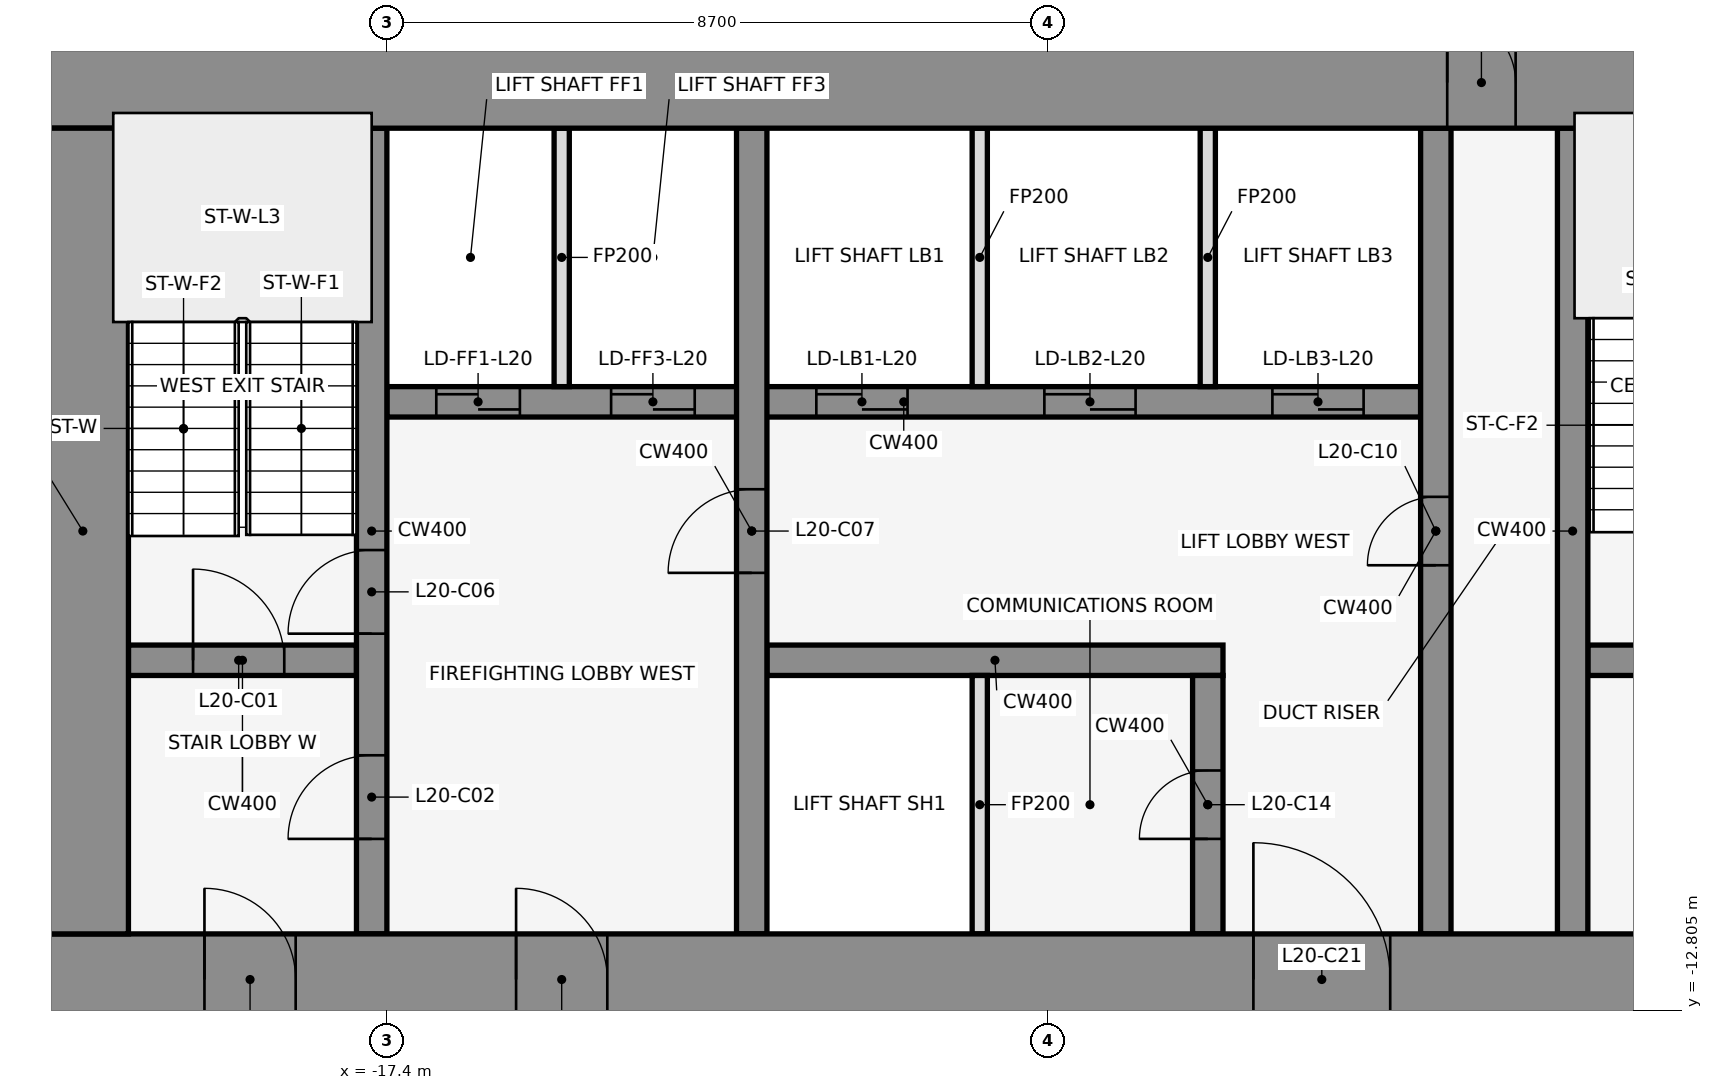
"""IFC4 building model, lengths in metres.
Left out: names, types, materials, properties, quantities, classifications, styles, units other than length and angle.
Written with IfcOpenShell. Run it as: python <this file> out.ifc"""

import sys

from ifc_helpers import new_model, si_unit, direction, frame, frame_2d, origin, place, context, subcontext, project, spatial, rectangle, extrude, element, fill, save


model = new_model("IFC4")
c1 = context("Model", 3, precision=1e-05, world=origin(), true_north=direction((0.0, 1.0)))
c2 = subcontext(c1, "Body", "Model", "MODEL_VIEW")
j1 = project(units=[si_unit("LENGTHUNIT", "METRE"), si_unit("PLANEANGLEUNIT", "RADIAN")], contexts=[c1])
p1 = place(None, origin())
s1 = spatial("IfcSite", under=j1, at=p1, CompositionType="ELEMENT")
p2 = place(p1, origin())
s2 = spatial("IfcBuilding", under=s1, at=p2, CompositionType="ELEMENT")
p3 = place(p2, frame((0.0, 0.0, 98.1)))
s3 = spatial("IfcBuildingStorey", under=s2, at=p3, CompositionType="ELEMENT", Elevation=98.1)
for number, where, z_axis, x_axis in (
    (1, (-0.068, -0.105, 0.0), (0.0, 0.0, 1.0), (-0.84, 0.543, 0.0)),
    (2, (-14.599, 1.08, 0.0), (0.0, 0.0, 1.0), (-0.84, -0.543, 0.0)),
):
    element("IfcWall", number, at=place(p3, frame(where, z_axis=z_axis, x_axis=x_axis)), inside=s3, PredefinedType="STANDARD", context=c2, shape_type="SweptSolid", body=[
        extrude(rectangle(XDim=2.183, YDim=0.25, at=frame_2d((1.091, 0.0))), origin(), (0.0, 0.0, 1.0), 3.95),
    ])
p4 = place(p3, frame((-20.8, -8.2, 0.0), z_axis=(0.0, 0.0, 1.0), x_axis=(1.0, 0.0, 0.0)))
e3 = element("IfcWall", 3, at=p4, inside=s3, PredefinedType="SHEAR", context=c2, shape_type="SweptSolid", body=[
    extrude(rectangle(XDim=3.0, YDim=0.4, at=frame_2d((1.5, 0.0))), origin(), (0.0, 0.0, 1.0), 4.1),
])
p5 = place(p4, frame((0.85, 0.0, 0.0)))
e4 = element("IfcOpeningElement", 4, at=p5, cuts=e3, PredefinedType="OPENING", context=c2, shape_type="SweptSolid", body=[
    extrude(rectangle(XDim=1.2, YDim=2.1, at=frame_2d((0.6, 1.05))), frame((0.0, 0.212, 0.0), z_axis=(0.0, -1.0, 0.0), x_axis=(1.0, 0.0, 0.0)), (0.0, 0.0, 1.0), 0.424),
])
p6 = place(p3, frame((-12.4, -8.2, 0.0), z_axis=(0.0, 0.0, 1.0), x_axis=(1.0, 0.0, 0.0)))
e5 = element("IfcWall", 5, at=p6, inside=s3, PredefinedType="SHEAR", context=c2, shape_type="SweptSolid", body=[
    extrude(rectangle(XDim=6.0, YDim=0.4, at=frame_2d((3.0, 0.0))), origin(), (0.0, 0.0, 1.0), 4.1),
])
p7 = place(p3, frame((-1.6, -8.2, 0.0), z_axis=(0.0, 0.0, 1.0), x_axis=(1.0, 0.0, 0.0)))
e6 = element("IfcWall", 6, at=p7, inside=s3, PredefinedType="SHEAR", context=c2, shape_type="SweptSolid", body=[
    extrude(rectangle(XDim=3.2, YDim=0.4, at=frame_2d((1.6, 0.0))), origin(), (0.0, 0.0, 1.0), 4.1),
])
p8 = place(p7, frame((1.05, 0.0, 0.0)))
e7 = element("IfcOpeningElement", 7, at=p8, cuts=e6, PredefinedType="OPENING", context=c2, shape_type="SweptSolid", body=[
    extrude(rectangle(XDim=1.2, YDim=2.1, at=frame_2d((0.6, 1.05))), frame((0.0, 0.212, 0.0), z_axis=(0.0, -1.0, 0.0), x_axis=(1.0, 0.0, 0.0)), (0.0, 0.0, 1.0), 0.424),
])
p9 = place(p3, frame((-17.4, -4.8, 0.0), z_axis=(0.0, 0.0, 1.0), x_axis=(1.0, 0.0, 0.0)))
e8 = element("IfcWall", 8, at=p9, inside=s3, PredefinedType="SHEAR", context=c2, shape_type="SweptSolid", body=[
    extrude(rectangle(XDim=13.6, YDim=0.4, at=frame_2d((6.8, 0.0))), origin(), (0.0, 0.0, 1.0), 4.1),
])
p10 = place(p9, frame((0.65, 0.0, 0.0)))
e9 = element("IfcOpeningElement", 9, at=p10, cuts=e8, PredefinedType="OPENING", context=c2, shape_type="SweptSolid", body=[
    extrude(rectangle(XDim=1.1, YDim=2.1, at=frame_2d((0.55, 1.05))), frame((0.0, 0.212, 0.0), z_axis=(0.0, -1.0, 0.0), x_axis=(1.0, 0.0, 0.0)), (0.0, 0.0, 1.0), 0.424),
])
p11 = place(p9, frame((2.95, 0.0, 0.0)))
e10 = element("IfcOpeningElement", 10, at=p11, cuts=e8, PredefinedType="OPENING", context=c2, shape_type="SweptSolid", body=[
    extrude(rectangle(XDim=1.1, YDim=2.1, at=frame_2d((0.55, 1.05))), frame((0.0, 0.212, 0.0), z_axis=(0.0, -1.0, 0.0), x_axis=(1.0, 0.0, 0.0)), (0.0, 0.0, 1.0), 0.424),
])
p12 = place(p9, frame((5.65, 0.0, 0.0)))
e11 = element("IfcOpeningElement", 11, at=p12, cuts=e8, PredefinedType="OPENING", context=c2, shape_type="SweptSolid", body=[
    extrude(rectangle(XDim=1.2, YDim=2.1, at=frame_2d((0.6, 1.05))), frame((0.0, 0.212, 0.0), z_axis=(0.0, -1.0, 0.0), x_axis=(1.0, 0.0, 0.0)), (0.0, 0.0, 1.0), 0.424),
])
p13 = place(p9, frame((8.65, 0.0, 0.0)))
e12 = element("IfcOpeningElement", 12, at=p13, cuts=e8, PredefinedType="OPENING", context=c2, shape_type="SweptSolid", body=[
    extrude(rectangle(XDim=1.2, YDim=2.1, at=frame_2d((0.6, 1.05))), frame((0.0, 0.212, 0.0), z_axis=(0.0, -1.0, 0.0), x_axis=(1.0, 0.0, 0.0)), (0.0, 0.0, 1.0), 0.424),
])
p14 = place(p9, frame((11.65, 0.0, 0.0)))
e13 = element("IfcOpeningElement", 13, at=p14, cuts=e8, PredefinedType="OPENING", context=c2, shape_type="SweptSolid", body=[
    extrude(rectangle(XDim=1.2, YDim=2.1, at=frame_2d((0.6, 1.05))), frame((0.0, 0.212, 0.0), z_axis=(0.0, -1.0, 0.0), x_axis=(1.0, 0.0, 0.0)), (0.0, 0.0, 1.0), 0.424),
])
p15 = place(p3, frame((-17.6, -11.8, 0.0), z_axis=(0.0, 0.0, 1.0), x_axis=(0.0, 1.0, 0.0)))
e14 = element("IfcWall", 14, at=p15, inside=s3, PredefinedType="SHEAR", context=c2, shape_type="SweptSolid", body=[
    extrude(rectangle(XDim=10.6, YDim=0.4, at=frame_2d((5.3, 0.0))), origin(), (0.0, 0.0, 1.0), 4.1),
])
p16 = place(p15, frame((1.25, 0.0, 0.0)))
e15 = element("IfcOpeningElement", 15, at=p16, cuts=e14, PredefinedType="OPENING", context=c2, shape_type="SweptSolid", body=[
    extrude(rectangle(XDim=1.1, YDim=2.1, at=frame_2d((0.55, 1.05))), frame((0.0, 0.212, 0.0), z_axis=(0.0, -1.0, 0.0), x_axis=(1.0, 0.0, 0.0)), (0.0, 0.0, 1.0), 0.424),
])
p17 = place(p15, frame((3.95, 0.0, 0.0)))
e16 = element("IfcOpeningElement", 16, at=p17, cuts=e14, PredefinedType="OPENING", context=c2, shape_type="SweptSolid", body=[
    extrude(rectangle(XDim=1.1, YDim=2.1, at=frame_2d((0.55, 1.05))), frame((0.0, 0.212, 0.0), z_axis=(0.0, -1.0, 0.0), x_axis=(1.0, 0.0, 0.0)), (0.0, 0.0, 1.0), 0.424),
])
p18 = place(p3, frame((-15.1, -4.6, 0.0), z_axis=(0.0, 0.0, 1.0), x_axis=(0.0, 1.0, 0.0)))
e17 = element("IfcWall", 17, at=p18, inside=s3, PredefinedType="PARTITIONING", context=c2, shape_type="SweptSolid", body=[
    extrude(rectangle(XDim=3.4, YDim=0.2, at=frame_2d((1.7, 0.0))), origin(), (0.0, 0.0, 1.0), 3.018),
])
p19 = place(p3, frame((-12.6, -11.8, 0.0), z_axis=(0.0, 0.0, 1.0), x_axis=(0.0, 1.0, 0.0)))
e18 = element("IfcWall", 18, at=p19, inside=s3, PredefinedType="SHEAR", context=c2, shape_type="SweptSolid", body=[
    extrude(rectangle(XDim=10.6, YDim=0.4, at=frame_2d((5.3, 0.0))), origin(), (0.0, 0.0, 1.0), 4.1),
])
p20 = place(p19, frame((4.75, 0.0, 0.0)))
e19 = element("IfcOpeningElement", 19, at=p20, cuts=e18, PredefinedType="OPENING", context=c2, shape_type="SweptSolid", body=[
    extrude(rectangle(XDim=1.1, YDim=2.1, at=frame_2d((0.55, 1.05))), frame((0.0, 0.212, 0.0), z_axis=(0.0, -1.0, 0.0), x_axis=(1.0, 0.0, 0.0)), (0.0, 0.0, 1.0), 0.424),
])
for number, where, z_axis, x_axis in (
    (20, (-9.6, -11.8, 0.0), (0.0, 0.0, 1.0), (0.0, 1.0, 0.0)),
    (21, (-9.6, -4.6, 0.0), (0.0, 0.0, 1.0), (0.0, 1.0, 0.0)),
):
    element("IfcWall", number, at=place(p3, frame(where, z_axis=z_axis, x_axis=x_axis)), inside=s3, PredefinedType="PARTITIONING", context=c2, shape_type="SweptSolid", body=[
        extrude(rectangle(XDim=3.4, YDim=0.2, at=frame_2d((1.7, 0.0))), origin(), (0.0, 0.0, 1.0), 3.018),
    ])
p21 = place(p3, frame((-6.6, -11.8, 0.0), z_axis=(0.0, 0.0, 1.0), x_axis=(0.0, 1.0, 0.0)))
e22 = element("IfcWall", 22, at=p21, inside=s3, PredefinedType="SHEAR", context=c2, shape_type="SweptSolid", body=[
    extrude(rectangle(XDim=3.4, YDim=0.4, at=frame_2d((1.7, 0.0))), origin(), (0.0, 0.0, 1.0), 4.1),
])
p22 = place(p21, frame((1.25, 0.0, 0.0)))
e23 = element("IfcOpeningElement", 23, at=p22, cuts=e22, PredefinedType="OPENING", context=c2, shape_type="SweptSolid", body=[
    extrude(rectangle(XDim=0.9, YDim=2.1, at=frame_2d((0.45, 1.05))), frame((0.0, 0.212, 0.0), z_axis=(0.0, -1.0, 0.0), x_axis=(1.0, 0.0, 0.0)), (0.0, 0.0, 1.0), 0.424),
])
p23 = place(p3, frame((-6.6, -4.6, 0.0), z_axis=(0.0, 0.0, 1.0), x_axis=(0.0, 1.0, 0.0)))
e24 = element("IfcWall", 24, at=p23, inside=s3, PredefinedType="PARTITIONING", context=c2, shape_type="SweptSolid", body=[
    extrude(rectangle(XDim=3.4, YDim=0.2, at=frame_2d((1.7, 0.0))), origin(), (0.0, 0.0, 1.0), 3.018),
])
p24 = place(p3, frame((-3.6, -11.8, 0.0), z_axis=(0.0, 0.0, 1.0), x_axis=(0.0, 1.0, 0.0)))
e25 = element("IfcWall", 25, at=p24, inside=s3, PredefinedType="SHEAR", context=c2, shape_type="SweptSolid", body=[
    extrude(rectangle(XDim=10.6, YDim=0.4, at=frame_2d((5.3, 0.0))), origin(), (0.0, 0.0, 1.0), 4.1),
])
p25 = place(p24, frame((4.85, 0.0, 0.0)))
e26 = element("IfcOpeningElement", 26, at=p25, cuts=e25, PredefinedType="OPENING", context=c2, shape_type="SweptSolid", body=[
    extrude(rectangle(XDim=0.9, YDim=2.1, at=frame_2d((0.45, 1.05))), frame((0.0, 0.212, 0.0), z_axis=(0.0, -1.0, 0.0), x_axis=(1.0, 0.0, 0.0)), (0.0, 0.0, 1.0), 0.424),
])
p26 = place(p3, frame((-1.8, -11.8, 0.0), z_axis=(0.0, 0.0, 1.0), x_axis=(0.0, 1.0, 0.0)))
e27 = element("IfcWall", 27, at=p26, inside=s3, PredefinedType="SHEAR", context=c2, shape_type="SweptSolid", body=[
    extrude(rectangle(XDim=10.6, YDim=0.4, at=frame_2d((5.3, 0.0))), origin(), (0.0, 0.0, 1.0), 4.1),
])
p27 = place(p3, frame((-22.0, -0.6, 0.0), z_axis=(0.0, 0.0, 1.0), x_axis=(1.0, 0.0, 0.0)))
e28 = element("IfcWall", 28, at=p27, inside=s3, PredefinedType="SHEAR", context=c2, shape_type="SweptSolid", body=[
    extrude(rectangle(XDim=44.0, YDim=1.2, at=frame_2d((22.0, 0.0))), origin(), (0.0, 0.0, 1.0), 4.1),
])
p28 = place(p27, frame((18.55, 0.0, 0.0)))
e29 = element("IfcOpeningElement", 29, at=p28, cuts=e28, PredefinedType="OPENING", context=c2, shape_type="SweptSolid", body=[
    extrude(rectangle(XDim=0.9, YDim=2.1, at=frame_2d((0.45, 1.05))), frame((0.0, 0.612, 0.0), z_axis=(0.0, -1.0, 0.0), x_axis=(1.0, 0.0, 0.0)), (0.0, 0.0, 1.0), 1.224),
])
p29 = place(p27, frame((24.55, 0.0, 0.0)))
e30 = element("IfcOpeningElement", 30, at=p29, cuts=e28, PredefinedType="OPENING", context=c2, shape_type="SweptSolid", body=[
    extrude(rectangle(XDim=0.9, YDim=2.1, at=frame_2d((0.45, 1.05))), frame((0.0, 0.612, 0.0), z_axis=(0.0, -1.0, 0.0), x_axis=(1.0, 0.0, 0.0)), (0.0, 0.0, 1.0), 1.224),
])
p30 = place(p3, frame((-22.0, -12.4, 0.0), z_axis=(0.0, 0.0, 1.0), x_axis=(1.0, 0.0, 0.0)))
e31 = element("IfcWall", 31, at=p30, inside=s3, PredefinedType="SHEAR", context=c2, shape_type="SweptSolid", body=[
    extrude(rectangle(XDim=44.0, YDim=1.2, at=frame_2d((22.0, 0.0))), origin(), (0.0, 0.0, 1.0), 4.1),
])
p31 = place(p30, frame((2.2, 0.0, 0.0)))
e32 = element("IfcOpeningElement", 32, at=p31, cuts=e31, PredefinedType="OPENING", context=c2, shape_type="SweptSolid", body=[
    extrude(rectangle(XDim=1.2, YDim=2.1, at=frame_2d((0.6, 1.05))), frame((0.0, 0.612, 0.0), z_axis=(0.0, -1.0, 0.0), x_axis=(1.0, 0.0, 0.0)), (0.0, 0.0, 1.0), 1.224),
])
p32 = place(p30, frame((21.4, 0.0, 0.0)))
e33 = element("IfcOpeningElement", 33, at=p32, cuts=e31, PredefinedType="OPENING", context=c2, shape_type="SweptSolid", body=[
    extrude(rectangle(XDim=1.2, YDim=2.1, at=frame_2d((0.6, 1.05))), frame((0.0, 0.612, 0.0), z_axis=(0.0, -1.0, 0.0), x_axis=(1.0, 0.0, 0.0)), (0.0, 0.0, 1.0), 1.224),
])
p33 = place(p30, frame((40.6, 0.0, 0.0)))
e34 = element("IfcOpeningElement", 34, at=p33, cuts=e31, PredefinedType="OPENING", context=c2, shape_type="SweptSolid", body=[
    extrude(rectangle(XDim=1.2, YDim=2.1, at=frame_2d((0.6, 1.05))), frame((0.0, 0.612, 0.0), z_axis=(0.0, -1.0, 0.0), x_axis=(1.0, 0.0, 0.0)), (0.0, 0.0, 1.0), 1.224),
])
p34 = place(p30, frame((16.0, 0.0, 0.0)))
e35 = element("IfcOpeningElement", 35, at=p34, cuts=e31, PredefinedType="OPENING", context=c2, shape_type="SweptSolid", body=[
    extrude(rectangle(XDim=1.8, YDim=2.1, at=frame_2d((0.9, 1.05))), frame((0.0, 0.612, 0.0), z_axis=(0.0, -1.0, 0.0), x_axis=(1.0, 0.0, 0.0)), (0.0, 0.0, 1.0), 1.224),
])
p35 = place(p30, frame((6.3, 0.0, 0.0)))
e36 = element("IfcOpeningElement", 36, at=p35, cuts=e31, PredefinedType="OPENING", context=c2, shape_type="SweptSolid", body=[
    extrude(rectangle(XDim=1.2, YDim=2.1, at=frame_2d((0.6, 1.05))), frame((0.0, 0.612, 0.0), z_axis=(0.0, -1.0, 0.0), x_axis=(1.0, 0.0, 0.0)), (0.0, 0.0, 1.0), 1.224),
])
p36 = place(p30, frame((26.2, 0.0, 0.0)))
e37 = element("IfcOpeningElement", 37, at=p36, cuts=e31, PredefinedType="OPENING", context=c2, shape_type="SweptSolid", body=[
    extrude(rectangle(XDim=1.8, YDim=2.1, at=frame_2d((0.9, 1.05))), frame((0.0, 0.612, 0.0), z_axis=(0.0, -1.0, 0.0), x_axis=(1.0, 0.0, 0.0)), (0.0, 0.0, 1.0), 1.224),
])
p37 = place(p30, frame((36.5, 0.0, 0.0)))
e38 = element("IfcOpeningElement", 38, at=p37, cuts=e31, PredefinedType="OPENING", context=c2, shape_type="SweptSolid", body=[
    extrude(rectangle(XDim=1.2, YDim=2.1, at=frame_2d((0.6, 1.05))), frame((0.0, 0.612, 0.0), z_axis=(0.0, -1.0, 0.0), x_axis=(1.0, 0.0, 0.0)), (0.0, 0.0, 1.0), 1.224),
])
p38 = place(p3, frame((-21.4, -11.8, 0.0), z_axis=(0.0, 0.0, 1.0), x_axis=(0.0, 1.0, 0.0)))
e39 = element("IfcWall", 39, at=p38, inside=s3, PredefinedType="SHEAR", context=c2, shape_type="SweptSolid", body=[
    extrude(rectangle(XDim=10.6, YDim=1.2, at=frame_2d((5.3, 0.0))), origin(), (0.0, 0.0, 1.0), 4.1),
])
p39 = place(p5, origin())
e40 = element("IfcDoor", 40, at=p39, inside=s3, OperationType="SINGLE_SWING_LEFT", PredefinedType="DOOR", context=c2, shape_type="SweptSolid", body=[
    extrude(rectangle(XDim=1.2, YDim=2.1, at=frame_2d((0.6, 1.05))), frame((0.0, 0.025, 0.0), z_axis=(0.0, -1.0, 0.0), x_axis=(1.0, 0.0, 0.0)), (0.0, 0.0, 1.0), 0.05),
])
fill(e4, e40)
p40 = place(p16, frame((1.1, 0.0, 0.0), z_axis=(0.0, 0.0, 1.0), x_axis=(-1.0, 0.0, 0.0)))
e41 = element("IfcDoor", 41, at=p40, inside=s3, OperationType="SINGLE_SWING_LEFT", PredefinedType="DOOR", context=c2, shape_type="SweptSolid", body=[
    extrude(rectangle(XDim=1.1, YDim=2.1, at=frame_2d((0.55, 1.05))), frame((0.0, 0.025, 0.0), z_axis=(0.0, -1.0, 0.0), x_axis=(1.0, 0.0, 0.0)), (0.0, 0.0, 1.0), 0.05),
])
fill(e15, e41)
p41 = place(p10, origin())
e42 = element("IfcDoor", 42, at=p41, inside=s3, OperationType="DOUBLE_DOOR_SLIDING", PredefinedType="DOOR", context=c2, shape_type="SweptSolid", body=[
    extrude(rectangle(XDim=1.1, YDim=2.1, at=frame_2d((0.55, 1.05))), frame((0.0, 0.025, 0.0), z_axis=(0.0, -1.0, 0.0), x_axis=(1.0, 0.0, 0.0)), (0.0, 0.0, 1.0), 0.05),
])
fill(e9, e42)
p42 = place(p11, origin())
e43 = element("IfcDoor", 43, at=p42, inside=s3, OperationType="DOUBLE_DOOR_SLIDING", PredefinedType="DOOR", context=c2, shape_type="SweptSolid", body=[
    extrude(rectangle(XDim=1.1, YDim=2.1, at=frame_2d((0.55, 1.05))), frame((0.0, 0.025, 0.0), z_axis=(0.0, -1.0, 0.0), x_axis=(1.0, 0.0, 0.0)), (0.0, 0.0, 1.0), 0.05),
])
fill(e10, e43)
p43 = place(p12, origin())
e44 = element("IfcDoor", 44, at=p43, inside=s3, OperationType="DOUBLE_DOOR_SLIDING", PredefinedType="DOOR", context=c2, shape_type="SweptSolid", body=[
    extrude(rectangle(XDim=1.2, YDim=2.1, at=frame_2d((0.6, 1.05))), frame((0.0, 0.025, 0.0), z_axis=(0.0, -1.0, 0.0), x_axis=(1.0, 0.0, 0.0)), (0.0, 0.0, 1.0), 0.05),
])
fill(e11, e44)
p44 = place(p13, origin())
e45 = element("IfcDoor", 45, at=p44, inside=s3, OperationType="DOUBLE_DOOR_SLIDING", PredefinedType="DOOR", context=c2, shape_type="SweptSolid", body=[
    extrude(rectangle(XDim=1.2, YDim=2.1, at=frame_2d((0.6, 1.05))), frame((0.0, 0.025, 0.0), z_axis=(0.0, -1.0, 0.0), x_axis=(1.0, 0.0, 0.0)), (0.0, 0.0, 1.0), 0.05),
])
fill(e12, e45)
p45 = place(p14, origin())
e46 = element("IfcDoor", 46, at=p45, inside=s3, OperationType="DOUBLE_DOOR_SLIDING", PredefinedType="DOOR", context=c2, shape_type="SweptSolid", body=[
    extrude(rectangle(XDim=1.2, YDim=2.1, at=frame_2d((0.6, 1.05))), frame((0.0, 0.025, 0.0), z_axis=(0.0, -1.0, 0.0), x_axis=(1.0, 0.0, 0.0)), (0.0, 0.0, 1.0), 0.05),
])
fill(e13, e46)
p46 = place(p17, frame((1.1, 0.0, 0.0), z_axis=(0.0, 0.0, 1.0), x_axis=(-1.0, 0.0, 0.0)))
e47 = element("IfcDoor", 47, at=p46, inside=s3, OperationType="SINGLE_SWING_LEFT", PredefinedType="DOOR", context=c2, shape_type="SweptSolid", body=[
    extrude(rectangle(XDim=1.1, YDim=2.1, at=frame_2d((0.55, 1.05))), frame((0.0, 0.025, 0.0), z_axis=(0.0, -1.0, 0.0), x_axis=(1.0, 0.0, 0.0)), (0.0, 0.0, 1.0), 0.05),
])
fill(e16, e47)
p47 = place(p20, origin())
e48 = element("IfcDoor", 48, at=p47, inside=s3, OperationType="SINGLE_SWING_LEFT", PredefinedType="DOOR", context=c2, shape_type="SweptSolid", body=[
    extrude(rectangle(XDim=1.1, YDim=2.1, at=frame_2d((0.55, 1.05))), frame((0.0, 0.025, 0.0), z_axis=(0.0, -1.0, 0.0), x_axis=(1.0, 0.0, 0.0)), (0.0, 0.0, 1.0), 0.05),
])
fill(e19, e48)
p48 = place(p25, frame((0.9, 0.0, 0.0), z_axis=(0.0, 0.0, 1.0), x_axis=(-1.0, 0.0, 0.0)))
e49 = element("IfcDoor", 49, at=p48, inside=s3, OperationType="SINGLE_SWING_LEFT", PredefinedType="DOOR", context=c2, shape_type="SweptSolid", body=[
    extrude(rectangle(XDim=0.9, YDim=2.1, at=frame_2d((0.45, 1.05))), frame((0.0, 0.025, 0.0), z_axis=(0.0, -1.0, 0.0), x_axis=(1.0, 0.0, 0.0)), (0.0, 0.0, 1.0), 0.05),
])
fill(e26, e49)
p49 = place(p22, origin())
e50 = element("IfcDoor", 50, at=p49, inside=s3, OperationType="SINGLE_SWING_RIGHT", PredefinedType="DOOR", context=c2, shape_type="SweptSolid", body=[
    extrude(rectangle(XDim=0.9, YDim=2.1, at=frame_2d((0.45, 1.05))), frame((0.0, 0.025, 0.0), z_axis=(0.0, -1.0, 0.0), x_axis=(1.0, 0.0, 0.0)), (0.0, 0.0, 1.0), 0.05),
])
fill(e23, e50)
p50 = place(p28, origin())
e51 = element("IfcDoor", 51, at=p50, inside=s3, OperationType="SINGLE_SWING_LEFT", PredefinedType="DOOR", context=c2, shape_type="SweptSolid", body=[
    extrude(rectangle(XDim=0.9, YDim=2.1, at=frame_2d((0.45, 1.05))), frame((0.0, 0.025, 0.0), z_axis=(0.0, -1.0, 0.0), x_axis=(1.0, 0.0, 0.0)), (0.0, 0.0, 1.0), 0.05),
])
fill(e29, e51)
p51 = place(p31, frame((1.2, 0.0, 0.0), z_axis=(0.0, 0.0, 1.0), x_axis=(-1.0, 0.0, 0.0)))
e52 = element("IfcDoor", 52, at=p51, inside=s3, OperationType="SINGLE_SWING_RIGHT", PredefinedType="DOOR", context=c2, shape_type="SweptSolid", body=[
    extrude(rectangle(XDim=1.2, YDim=2.1, at=frame_2d((0.6, 1.05))), frame((0.0, 0.025, 0.0), z_axis=(0.0, -1.0, 0.0), x_axis=(1.0, 0.0, 0.0)), (0.0, 0.0, 1.0), 0.05),
])
fill(e32, e52)
p52 = place(p34, origin())
e53 = element("IfcDoor", 53, at=p52, inside=s3, OperationType="SINGLE_SWING_LEFT", PredefinedType="DOOR", context=c2, shape_type="SweptSolid", body=[
    extrude(rectangle(XDim=1.8, YDim=2.1, at=frame_2d((0.9, 1.05))), frame((0.0, 0.025, 0.0), z_axis=(0.0, -1.0, 0.0), x_axis=(1.0, 0.0, 0.0)), (0.0, 0.0, 1.0), 0.05),
])
fill(e35, e53)
p53 = place(p35, frame((1.2, 0.0, 0.0), z_axis=(0.0, 0.0, 1.0), x_axis=(-1.0, 0.0, 0.0)))
e54 = element("IfcDoor", 54, at=p53, inside=s3, OperationType="SINGLE_SWING_RIGHT", PredefinedType="DOOR", context=c2, shape_type="SweptSolid", body=[
    extrude(rectangle(XDim=1.2, YDim=2.1, at=frame_2d((0.6, 1.05))), frame((0.0, 0.025, 0.0), z_axis=(0.0, -1.0, 0.0), x_axis=(1.0, 0.0, 0.0)), (0.0, 0.0, 1.0), 0.05),
])
fill(e36, e54)
save(model, sys.argv[1])
